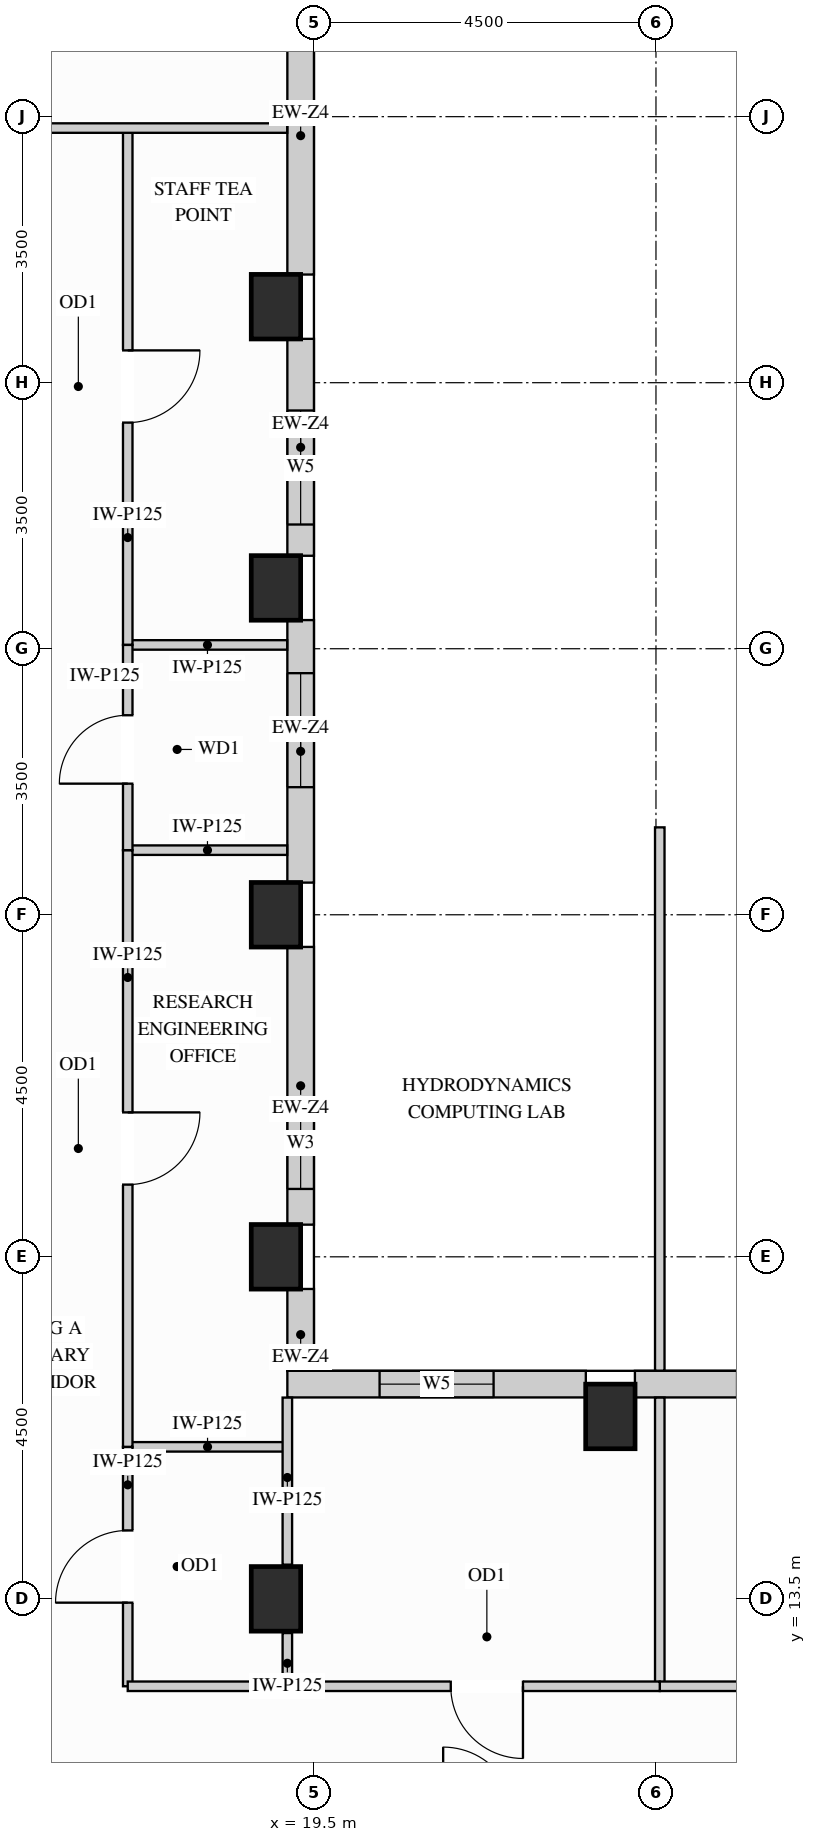
"""IFC4 building model, lengths in metres.
Left out: names, types, materials, properties, quantities, classifications, styles, units other than length and angle.
Written with IfcOpenShell. Run it as: python <this file> out.ifc"""

import sys

from ifc_helpers import new_model, si_unit, direction, frame, frame_2d, origin, origin_2d, place, context, subcontext, project, spatial, rectangle, extrude, source, transform, mapped, element, fill, save


model = new_model("IFC4")
c1 = context("Model", 3, precision=1e-05, world=origin(), true_north=direction((0.0, 1.0)))
c2 = subcontext(c1, "Body", "Model", "MODEL_VIEW")
j1 = project(units=[si_unit("LENGTHUNIT", "METRE"), si_unit("PLANEANGLEUNIT", "RADIAN")], contexts=[c1])
p1 = place(None, origin())
s1 = spatial("IfcSite", under=j1, at=p1, CompositionType="ELEMENT")
p2 = place(p1, origin())
s2 = spatial("IfcBuilding", under=s1, at=p2, CompositionType="ELEMENT")
p3 = place(p2, frame((0.0, 0.0, 230.4)))
s3 = spatial("IfcBuildingStorey", under=s2, at=p3, CompositionType="ELEMENT", Elevation=230.4)
m1 = source(origin(), c2, "Body", "SweptSolid", [
    extrude(rectangle(XDim=0.65, YDim=0.85, at=origin_2d()), origin(), (0.0, 0.0, 1.0), 3.4),
])
for number, where, z_axis, x_axis in (
    (1, (19.0, 13.5, 0.0), (0.0, 0.0, 1.0), (1.0, 0.0, 0.0)),
    (2, (19.0, 18.0, 0.0), (0.0, 0.0, 1.0), (1.0, 0.0, 0.0)),
    (3, (19.0, 22.5, 0.0), (0.0, 0.0, 1.0), (1.0, 0.0, 0.0)),
    (4, (19.0, 26.8, 0.0), (0.0, 0.0, 1.0), (1.0, 0.0, 0.0)),
    (5, (19.0, 30.5, 0.0), (0.0, 0.0, 1.0), (1.0, 0.0, 0.0)),
    (6, (23.4, 15.9, 0.0), (0.0, 0.0, 1.0), (1.0, 0.0, 0.0)),
):
    element("IfcColumn", number, at=place(p3, frame(where, z_axis=z_axis, x_axis=x_axis)), inside=s3, PredefinedType="COLUMN", context=c2, shape_type="MappedRepresentation", body=[
        mapped(m1, transform((0.0, 0.0, 0.0), x_axis=(1.0, 0.0, 0.0), y_axis=(0.0, 1.0, 0.0), z_axis=(0.0, 0.0, 1.0))),
    ])
m2 = source(origin(), c2, "Body", "SweptSolid", [
    extrude(rectangle(XDim=1.079, YDim=0.35, at=frame_2d((0.54, 0.0))), origin(), (0.0, 0.0, 1.0), 2.619),
])
p4 = place(p3, frame((19.325, 16.498, 0.0), z_axis=(0.0, 0.0, 1.0), x_axis=(0.0, 1.0, 0.0)))
e7 = element("IfcWall", 7, at=p4, inside=s3, PredefinedType="SOLIDWALL", context=c2, shape_type="MappedRepresentation", body=[
    mapped(m2, transform((0.0, 0.0, 0.0), x_axis=(1.0, 0.0, 0.0), y_axis=(0.0, 1.0, 0.0), z_axis=(0.0, 0.0, 1.0))),
])
p5 = place(p3, frame((19.325, 18.423, 0.0), z_axis=(0.0, 0.0, 1.0), x_axis=(0.0, 1.0, 0.0)))
e8 = element("IfcWall", 8, at=p5, inside=s3, PredefinedType="SOLIDWALL", context=c2, shape_type="SweptSolid", body=[
    extrude(rectangle(XDim=3.654, YDim=0.35, at=frame_2d((1.827, 0.0))), origin(), (0.0, 0.0, 1.0), 2.619),
])
p6 = place(p5, frame((0.47, 0.0, 0.78)))
e9 = element("IfcOpeningElement", 9, at=p6, cuts=e8, PredefinedType="OPENING", context=c2, shape_type="SweptSolid", body=[
    extrude(rectangle(XDim=1.2, YDim=1.659, at=frame_2d((0.6, 0.83))), frame((0.0, 0.185, 0.0), z_axis=(0.0, -1.0, 0.0), x_axis=(1.0, 0.0, 0.0)), (0.0, 0.0, 1.0), 0.37),
])
p7 = place(p3, frame((19.325, 22.923, 0.0), z_axis=(0.0, 0.0, 1.0), x_axis=(0.0, 1.0, 0.0)))
e10 = element("IfcWall", 10, at=p7, inside=s3, PredefinedType="SOLIDWALL", context=c2, shape_type="SweptSolid", body=[
    extrude(rectangle(XDim=3.454, YDim=0.35, at=frame_2d((1.727, 0.0))), origin(), (0.0, 0.0, 1.0), 2.619),
])
p8 = place(p7, frame((1.256, 0.0, 0.78)))
e11 = element("IfcOpeningElement", 11, at=p8, cuts=e10, PredefinedType="OPENING", context=c2, shape_type="SweptSolid", body=[
    extrude(rectangle(XDim=1.5, YDim=1.659, at=frame_2d((0.75, 0.83))), frame((0.0, 0.185, 0.0), z_axis=(0.0, -1.0, 0.0), x_axis=(1.0, 0.0, 0.0)), (0.0, 0.0, 1.0), 0.37),
])
p9 = place(p3, frame((19.325, 27.223, 0.0), z_axis=(0.0, 0.0, 1.0), x_axis=(0.0, 1.0, 0.0)))
e12 = element("IfcWall", 12, at=p9, inside=s3, PredefinedType="SOLIDWALL", context=c2, shape_type="SweptSolid", body=[
    extrude(rectangle(XDim=2.854, YDim=0.35, at=frame_2d((1.427, 0.0))), origin(), (0.0, 0.0, 1.0), 2.619),
])
p10 = place(p9, frame((0.411, 0.0, 0.78)))
e13 = element("IfcOpeningElement", 13, at=p10, cuts=e12, PredefinedType="OPENING", context=c2, shape_type="SweptSolid", body=[
    extrude(rectangle(XDim=1.5, YDim=1.659, at=frame_2d((0.75, 0.83))), frame((0.0, 0.185, 0.0), z_axis=(0.0, -1.0, 0.0), x_axis=(1.0, 0.0, 0.0)), (0.0, 0.0, 1.0), 0.37),
])
m3 = source(origin(), c2, "Body", "SweptSolid", [
    extrude(rectangle(XDim=3.654, YDim=0.35, at=frame_2d((1.827, 0.0))), origin(), (0.0, 0.0, 1.0), 2.619),
])
p11 = place(p3, frame((19.325, 30.923, 0.0), z_axis=(0.0, 0.0, 1.0), x_axis=(0.0, 1.0, 0.0)))
e14 = element("IfcWall", 14, at=p11, inside=s3, PredefinedType="SOLIDWALL", context=c2, shape_type="MappedRepresentation", body=[
    mapped(m3, transform((0.0, 0.0, 0.0), x_axis=(1.0, 0.0, 0.0), y_axis=(0.0, 1.0, 0.0), z_axis=(0.0, 0.0, 1.0))),
])
p12 = place(p3, frame((30.177, 16.325, 0.0), z_axis=(0.0, 0.0, 1.0), x_axis=(-1.0, 0.0, 0.0)))
e15 = element("IfcWall", 15, at=p12, inside=s3, PredefinedType="SOLIDWALL", context=c2, shape_type="SweptSolid", body=[
    extrude(rectangle(XDim=6.454, YDim=0.35, at=frame_2d((3.227, 0.0))), origin(), (0.0, 0.0, 1.0), 3.385),
])
p13 = place(p12, frame((1.344, 0.0, 0.78)))
e16 = element("IfcOpeningElement", 16, at=p13, cuts=e15, PredefinedType="OPENING", context=c2, shape_type="SweptSolid", body=[
    extrude(rectangle(XDim=1.5, YDim=2.0, at=frame_2d((0.75, 1.0))), frame((0.0, 0.185, 0.0), z_axis=(0.0, -1.0, 0.0), x_axis=(1.0, 0.0, 0.0)), (0.0, 0.0, 1.0), 0.37),
])
p14 = place(p12, frame((3.61, 0.0, 0.78)))
e17 = element("IfcOpeningElement", 17, at=p14, cuts=e15, PredefinedType="OPENING", context=c2, shape_type="SweptSolid", body=[
    extrude(rectangle(XDim=1.5, YDim=2.0, at=frame_2d((0.75, 1.0))), frame((0.0, 0.185, 0.0), z_axis=(0.0, -1.0, 0.0), x_axis=(1.0, 0.0, 0.0)), (0.0, 0.0, 1.0), 0.37),
])
p15 = place(p3, frame((23.077, 16.325, 0.0), z_axis=(0.0, 0.0, 1.0), x_axis=(-1.0, 0.0, 0.0)))
e18 = element("IfcWall", 18, at=p15, inside=s3, PredefinedType="SOLIDWALL", context=c2, shape_type="SweptSolid", body=[
    extrude(rectangle(XDim=3.927, YDim=0.35, at=frame_2d((1.963, 0.0))), origin(), (0.0, 0.0, 1.0), 3.385),
])
p16 = place(p15, frame((1.213, 0.0, 0.78)))
e19 = element("IfcOpeningElement", 19, at=p16, cuts=e18, PredefinedType="OPENING", context=c2, shape_type="SweptSolid", body=[
    extrude(rectangle(XDim=1.5, YDim=2.0, at=frame_2d((0.75, 1.0))), frame((0.0, 0.185, 0.0), z_axis=(0.0, -1.0, 0.0), x_axis=(1.0, 0.0, 0.0)), (0.0, 0.0, 1.0), 0.37),
])
m4 = source(origin(), c2, "Body", "SweptSolid", [
    extrude(rectangle(XDim=2.1, YDim=0.125, at=frame_2d((1.05, 0.0))), origin(), (0.0, 0.0, 1.0), 3.385),
])
p17 = place(p3, frame((17.05, 15.5, 0.0), z_axis=(0.0, 0.0, 1.0), x_axis=(1.0, 0.0, 0.0)))
e20 = element("IfcWall", 20, at=p17, inside=s3, PredefinedType="PARTITIONING", context=c2, shape_type="MappedRepresentation", body=[
    mapped(m4, transform((0.0, 0.0, 0.0), x_axis=(1.0, 0.0, 0.0), y_axis=(0.0, 1.0, 0.0), z_axis=(0.0, 0.0, 1.0))),
])
m5 = source(origin(), c2, "Body", "SweptSolid", [
    extrude(rectangle(XDim=2.098, YDim=0.125, at=frame_2d((1.049, 0.0))), origin(), (0.0, 0.0, 1.0), 3.385),
])
for number, where, z_axis, x_axis in (
    (21, (17.05, 23.35, 0.0), (0.0, 0.0, 1.0), (1.0, 0.0, 0.0)),
    (22, (17.05, 26.05, 0.0), (0.0, 0.0, 1.0), (1.0, 0.0, 0.0)),
):
    element("IfcWall", number, at=place(p3, frame(where, z_axis=z_axis, x_axis=x_axis)), inside=s3, PredefinedType="PARTITIONING", context=c2, shape_type="MappedRepresentation", body=[
        mapped(m5, transform((0.0, 0.0, 0.0), x_axis=(1.0, 0.0, 0.0), y_axis=(0.0, 1.0, 0.0), z_axis=(0.0, 0.0, 1.0))),
    ])
m6 = source(origin(), c2, "Body", "SweptSolid", [
    extrude(rectangle(XDim=0.7, YDim=0.125, at=frame_2d((0.35, 0.0))), origin(), (0.0, 0.0, 1.0), 2.773),
])
p18 = place(p3, frame((19.15, 12.35, 0.0), z_axis=(0.0, 0.0, 1.0), x_axis=(0.0, 1.0, 0.0)))
e23 = element("IfcWall", 23, at=p18, inside=s3, PredefinedType="PARTITIONING", context=c2, shape_type="MappedRepresentation", body=[
    mapped(m6, transform((0.0, 0.0, 0.0), x_axis=(1.0, 0.0, 0.0), y_axis=(0.0, 1.0, 0.0), z_axis=(0.0, 0.0, 1.0))),
])
m7 = source(origin(), c2, "Body", "SweptSolid", [
    extrude(rectangle(XDim=2.198, YDim=0.125, at=frame_2d((1.099, 0.0))), origin(), (0.0, 0.0, 1.0), 2.619),
])
p19 = place(p3, frame((19.15, 13.95, 0.0), z_axis=(0.0, 0.0, 1.0), x_axis=(0.0, 1.0, 0.0)))
e24 = element("IfcWall", 24, at=p19, inside=s3, PredefinedType="PARTITIONING", context=c2, shape_type="MappedRepresentation", body=[
    mapped(m7, transform((0.0, 0.0, 0.0), x_axis=(1.0, 0.0, 0.0), y_axis=(0.0, 1.0, 0.0), z_axis=(0.0, 0.0, 1.0))),
])
p20 = place(p3, frame((17.05, 12.35, 0.0), z_axis=(0.0, 0.0, 1.0), x_axis=(0.0, 1.0, 0.0)))
e25 = element("IfcWall", 25, at=p20, inside=s3, PredefinedType="PARTITIONING", context=c2, shape_type="SweptSolid", body=[
    extrude(rectangle(XDim=3.15, YDim=0.125, at=frame_2d((1.575, 0.0))), origin(), (0.0, 0.0, 1.0), 3.385),
])
p21 = place(p20, frame((1.1, 0.0, 0.0)))
e26 = element("IfcOpeningElement", 26, at=p21, cuts=e25, PredefinedType="OPENING", context=c2, shape_type="SweptSolid", body=[
    extrude(rectangle(XDim=0.95, YDim=2.15, at=frame_2d((0.475, 1.075))), frame((0.0, 0.073, 0.0), z_axis=(0.0, -1.0, 0.0), x_axis=(1.0, 0.0, 0.0)), (0.0, 0.0, 1.0), 0.145),
])
p22 = place(p3, frame((17.05, 15.5, 0.0), z_axis=(0.0, 0.0, 1.0), x_axis=(0.0, 1.0, 0.0)))
e27 = element("IfcWall", 27, at=p22, inside=s3, PredefinedType="PARTITIONING", context=c2, shape_type="SweptSolid", body=[
    extrude(rectangle(XDim=7.85, YDim=0.125, at=frame_2d((3.925, 0.0))), origin(), (0.0, 0.0, 1.0), 3.385),
])
p23 = place(p22, frame((3.45, 0.0, 0.0)))
e28 = element("IfcOpeningElement", 28, at=p23, cuts=e27, PredefinedType="OPENING", context=c2, shape_type="SweptSolid", body=[
    extrude(rectangle(XDim=0.95, YDim=2.15, at=frame_2d((0.475, 1.075))), frame((0.0, 0.073, 0.0), z_axis=(0.0, -1.0, 0.0), x_axis=(1.0, 0.0, 0.0)), (0.0, 0.0, 1.0), 0.145),
])
p24 = place(p3, frame((17.05, 26.05, 0.0), z_axis=(0.0, 0.0, 1.0), x_axis=(0.0, 1.0, 0.0)))
e29 = element("IfcWall", 29, at=p24, inside=s3, PredefinedType="PARTITIONING", context=c2, shape_type="SweptSolid", body=[
    extrude(rectangle(XDim=6.8, YDim=0.125, at=frame_2d((3.4, 0.0))), origin(), (0.0, 0.0, 1.0), 3.385),
])
p25 = place(p24, frame((2.925, 0.0, 0.0)))
e30 = element("IfcOpeningElement", 30, at=p25, cuts=e29, PredefinedType="OPENING", context=c2, shape_type="SweptSolid", body=[
    extrude(rectangle(XDim=0.95, YDim=2.15, at=frame_2d((0.475, 1.075))), frame((0.0, 0.073, 0.0), z_axis=(0.0, -1.0, 0.0), x_axis=(1.0, 0.0, 0.0)), (0.0, 0.0, 1.0), 0.145),
])
p26 = place(p3, frame((17.05, 23.35, 0.0), z_axis=(0.0, 0.0, 1.0), x_axis=(0.0, 1.0, 0.0)))
e31 = element("IfcWall", 31, at=p26, inside=s3, PredefinedType="PARTITIONING", context=c2, shape_type="SweptSolid", body=[
    extrude(rectangle(XDim=2.7, YDim=0.125, at=frame_2d((1.35, 0.0))), origin(), (0.0, 0.0, 1.0), 3.385),
])
p27 = place(p26, frame((0.875, 0.0, 0.0)))
e32 = element("IfcOpeningElement", 32, at=p27, cuts=e31, PredefinedType="OPENING", context=c2, shape_type="SweptSolid", body=[
    extrude(rectangle(XDim=0.9, YDim=2.15, at=frame_2d((0.45, 1.075))), frame((0.0, 0.073, 0.0), z_axis=(0.0, -1.0, 0.0), x_axis=(1.0, 0.0, 0.0)), (0.0, 0.0, 1.0), 0.145),
])
m8 = source(origin(), c2, "Body", "SweptSolid", [
    extrude(rectangle(XDim=12.598, YDim=0.125, at=frame_2d((6.299, 0.0))), origin(), (0.0, 0.0, 1.0), 3.385),
])
p28 = place(p3, frame((6.55, 32.85, 0.0), z_axis=(0.0, 0.0, 1.0), x_axis=(1.0, 0.0, 0.0)))
e33 = element("IfcWall", 33, at=p28, inside=s3, PredefinedType="PARTITIONING", context=c2, shape_type="MappedRepresentation", body=[
    mapped(m8, transform((0.0, 0.0, 0.0), x_axis=(1.0, 0.0, 0.0), y_axis=(0.0, 1.0, 0.0), z_axis=(0.0, 0.0, 1.0))),
])
m9 = source(origin(), c2, "Body", "SweptSolid", [
    extrude(rectangle(XDim=3.798, YDim=0.125, at=frame_2d((1.899, 0.0))), origin(), (0.0, 0.0, 1.0), 3.385),
])
p29 = place(p3, frame((24.05, 12.35, 0.0), z_axis=(0.0, 0.0, 1.0), x_axis=(0.0, 1.0, 0.0)))
e34 = element("IfcWall", 34, at=p29, inside=s3, PredefinedType="PARTITIONING", context=c2, shape_type="MappedRepresentation", body=[
    mapped(m9, transform((0.0, 0.0, 0.0), x_axis=(1.0, 0.0, 0.0), y_axis=(0.0, 1.0, 0.0), z_axis=(0.0, 0.0, 1.0))),
])
m10 = source(origin(), c2, "Body", "SweptSolid", [
    extrude(rectangle(XDim=7.148, YDim=0.125, at=frame_2d((3.574, 0.0))), origin(), (0.0, 0.0, 1.0), 3.385),
])
p30 = place(p3, frame((24.05, 16.502, 0.0), z_axis=(0.0, 0.0, 1.0), x_axis=(0.0, 1.0, 0.0)))
e35 = element("IfcWall", 35, at=p30, inside=s3, PredefinedType="PARTITIONING", context=c2, shape_type="MappedRepresentation", body=[
    mapped(m10, transform((0.0, 0.0, 0.0), x_axis=(1.0, 0.0, 0.0), y_axis=(0.0, 1.0, 0.0), z_axis=(0.0, 0.0, 1.0))),
])
p31 = place(p3, frame((24.05, 12.35, 0.0), z_axis=(0.0, 0.0, 1.0), x_axis=(1.0, 0.0, 0.0)))
e36 = element("IfcWall", 36, at=p31, inside=s3, PredefinedType="PARTITIONING", context=c2, shape_type="SweptSolid", body=[
    extrude(rectangle(XDim=5.8, YDim=0.125, at=frame_2d((2.9, 0.0))), origin(), (0.0, 0.0, 1.0), 3.385),
])
p32 = place(p31, frame((2.425, 0.0, 0.0)))
e37 = element("IfcOpeningElement", 37, at=p32, cuts=e36, PredefinedType="OPENING", context=c2, shape_type="SweptSolid", body=[
    extrude(rectangle(XDim=0.95, YDim=2.15, at=frame_2d((0.475, 1.075))), frame((0.0, 0.073, 0.0), z_axis=(0.0, -1.0, 0.0), x_axis=(1.0, 0.0, 0.0)), (0.0, 0.0, 1.0), 0.145),
])
m11 = source(origin(), c2, "Body", "SweptSolid", [
    extrude(rectangle(XDim=2.45, YDim=0.125, at=frame_2d((1.225, 0.0))), origin(), (0.0, 0.0, 1.0), 3.385),
])
p33 = place(p3, frame((17.05, 12.35, 0.0), z_axis=(0.0, 0.0, 1.0), x_axis=(1.0, 0.0, 0.0)))
e38 = element("IfcWall", 38, at=p33, inside=s3, PredefinedType="PARTITIONING", context=c2, shape_type="MappedRepresentation", body=[
    mapped(m11, transform((0.0, 0.0, 0.0), x_axis=(1.0, 0.0, 0.0), y_axis=(0.0, 1.0, 0.0), z_axis=(0.0, 0.0, 1.0))),
])
p34 = place(p3, frame((19.5, 12.35, 0.0), z_axis=(0.0, 0.0, 1.0), x_axis=(1.0, 0.0, 0.0)))
e39 = element("IfcWall", 39, at=p34, inside=s3, PredefinedType="PARTITIONING", context=c2, shape_type="SweptSolid", body=[
    extrude(rectangle(XDim=4.55, YDim=0.125, at=frame_2d((2.275, 0.0))), origin(), (0.0, 0.0, 1.0), 3.385),
])
p35 = place(p34, frame((1.8, 0.0, 0.0)))
e40 = element("IfcOpeningElement", 40, at=p35, cuts=e39, PredefinedType="OPENING", context=c2, shape_type="SweptSolid", body=[
    extrude(rectangle(XDim=0.95, YDim=2.15, at=frame_2d((0.475, 1.075))), frame((0.0, 0.073, 0.0), z_axis=(0.0, -1.0, 0.0), x_axis=(1.0, 0.0, 0.0)), (0.0, 0.0, 1.0), 0.145),
])
m12 = source(origin(), c2, "Body", "SweptSolid", [
    extrude(rectangle(XDim=0.95, YDim=2.15, at=frame_2d((0.475, 1.075))), frame((0.0, 0.025, 0.0), z_axis=(0.0, -1.0, 0.0), x_axis=(1.0, 0.0, 0.0)), (0.0, 0.0, 1.0), 0.05),
])
p36 = place(p21, origin())
e41 = element("IfcDoor", 41, at=p36, inside=s3, OperationType="SINGLE_SWING_LEFT", PredefinedType="DOOR", context=c2, shape_type="MappedRepresentation", body=[
    mapped(m12, transform((0.0, 0.0, 0.0), x_axis=(1.0, 0.0, 0.0), y_axis=(0.0, 1.0, 0.0), z_axis=(0.0, 0.0, 1.0))),
])
fill(e26, e41)
p37 = place(p23, origin())
e42 = element("IfcDoor", 42, at=p37, inside=s3, OperationType="SINGLE_SWING_RIGHT", PredefinedType="DOOR", context=c2, shape_type="MappedRepresentation", body=[
    mapped(m12, transform((0.0, 0.0, 0.0), x_axis=(1.0, 0.0, 0.0), y_axis=(0.0, 1.0, 0.0), z_axis=(0.0, 0.0, 1.0))),
])
fill(e28, e42)
p38 = place(p25, origin())
e43 = element("IfcDoor", 43, at=p38, inside=s3, OperationType="SINGLE_SWING_RIGHT", PredefinedType="DOOR", context=c2, shape_type="MappedRepresentation", body=[
    mapped(m12, transform((0.0, 0.0, 0.0), x_axis=(1.0, 0.0, 0.0), y_axis=(0.0, 1.0, 0.0), z_axis=(0.0, 0.0, 1.0))),
])
fill(e30, e43)
p39 = place(p35, origin())
e44 = element("IfcDoor", 44, at=p39, inside=s3, OperationType="SINGLE_SWING_RIGHT", PredefinedType="DOOR", context=c2, shape_type="MappedRepresentation", body=[
    mapped(m12, transform((0.0, 0.0, 0.0), x_axis=(1.0, 0.0, 0.0), y_axis=(0.0, 1.0, 0.0), z_axis=(0.0, 0.0, 1.0))),
])
fill(e40, e44)
m13 = source(origin(), c2, "Body", "SweptSolid", [
    extrude(rectangle(XDim=0.9, YDim=2.15, at=frame_2d((0.45, 1.075))), frame((0.0, 0.025, 0.0), z_axis=(0.0, -1.0, 0.0), x_axis=(1.0, 0.0, 0.0)), (0.0, 0.0, 1.0), 0.05),
])
p40 = place(p27, origin())
e45 = element("IfcDoor", 45, at=p40, inside=s3, OperationType="SINGLE_SWING_LEFT", PredefinedType="DOOR", context=c2, shape_type="MappedRepresentation", body=[
    mapped(m13, transform((0.0, 0.0, 0.0), x_axis=(1.0, 0.0, 0.0), y_axis=(0.0, 1.0, 0.0), z_axis=(0.0, 0.0, 1.0))),
])
fill(e32, e45)
m14 = source(origin(), c2, "Body", "SweptSolid", [
    extrude(rectangle(XDim=1.2, YDim=1.659, at=frame_2d((0.6, 0.83))), frame((0.0, 0.03, 0.0), z_axis=(0.0, -1.0, 0.0), x_axis=(1.0, 0.0, 0.0)), (0.0, 0.0, 1.0), 0.06),
])
p41 = place(p6, origin())
e46 = element("IfcWindow", 46, at=p41, inside=s3, PartitioningType="SINGLE_PANEL", PredefinedType="WINDOW", context=c2, shape_type="MappedRepresentation", body=[
    mapped(m14, transform((0.0, 0.0, 0.0), x_axis=(1.0, 0.0, 0.0), y_axis=(0.0, 1.0, 0.0), z_axis=(0.0, 0.0, 1.0))),
])
fill(e9, e46)
m15 = source(origin(), c2, "Body", "SweptSolid", [
    extrude(rectangle(XDim=1.5, YDim=1.659, at=frame_2d((0.75, 0.83))), frame((0.0, 0.03, 0.0), z_axis=(0.0, -1.0, 0.0), x_axis=(1.0, 0.0, 0.0)), (0.0, 0.0, 1.0), 0.06),
])
p42 = place(p8, origin())
e47 = element("IfcWindow", 47, at=p42, inside=s3, PartitioningType="SINGLE_PANEL", PredefinedType="WINDOW", context=c2, shape_type="MappedRepresentation", body=[
    mapped(m15, transform((0.0, 0.0, 0.0), x_axis=(1.0, 0.0, 0.0), y_axis=(0.0, 1.0, 0.0), z_axis=(0.0, 0.0, 1.0))),
])
fill(e11, e47)
p43 = place(p10, origin())
e48 = element("IfcWindow", 48, at=p43, inside=s3, PartitioningType="SINGLE_PANEL", PredefinedType="WINDOW", context=c2, shape_type="MappedRepresentation", body=[
    mapped(m15, transform((0.0, 0.0, 0.0), x_axis=(1.0, 0.0, 0.0), y_axis=(0.0, 1.0, 0.0), z_axis=(0.0, 0.0, 1.0))),
])
fill(e13, e48)
m16 = source(origin(), c2, "Body", "SweptSolid", [
    extrude(rectangle(XDim=1.5, YDim=2.0, at=frame_2d((0.75, 1.0))), frame((0.0, 0.03, 0.0), z_axis=(0.0, -1.0, 0.0), x_axis=(1.0, 0.0, 0.0)), (0.0, 0.0, 1.0), 0.06),
])
p44 = place(p16, origin())
e49 = element("IfcWindow", 49, at=p44, inside=s3, PartitioningType="SINGLE_PANEL", PredefinedType="WINDOW", context=c2, shape_type="MappedRepresentation", body=[
    mapped(m16, transform((0.0, 0.0, 0.0), x_axis=(1.0, 0.0, 0.0), y_axis=(0.0, 1.0, 0.0), z_axis=(0.0, 0.0, 1.0))),
])
fill(e19, e49)
save(model, sys.argv[1])
